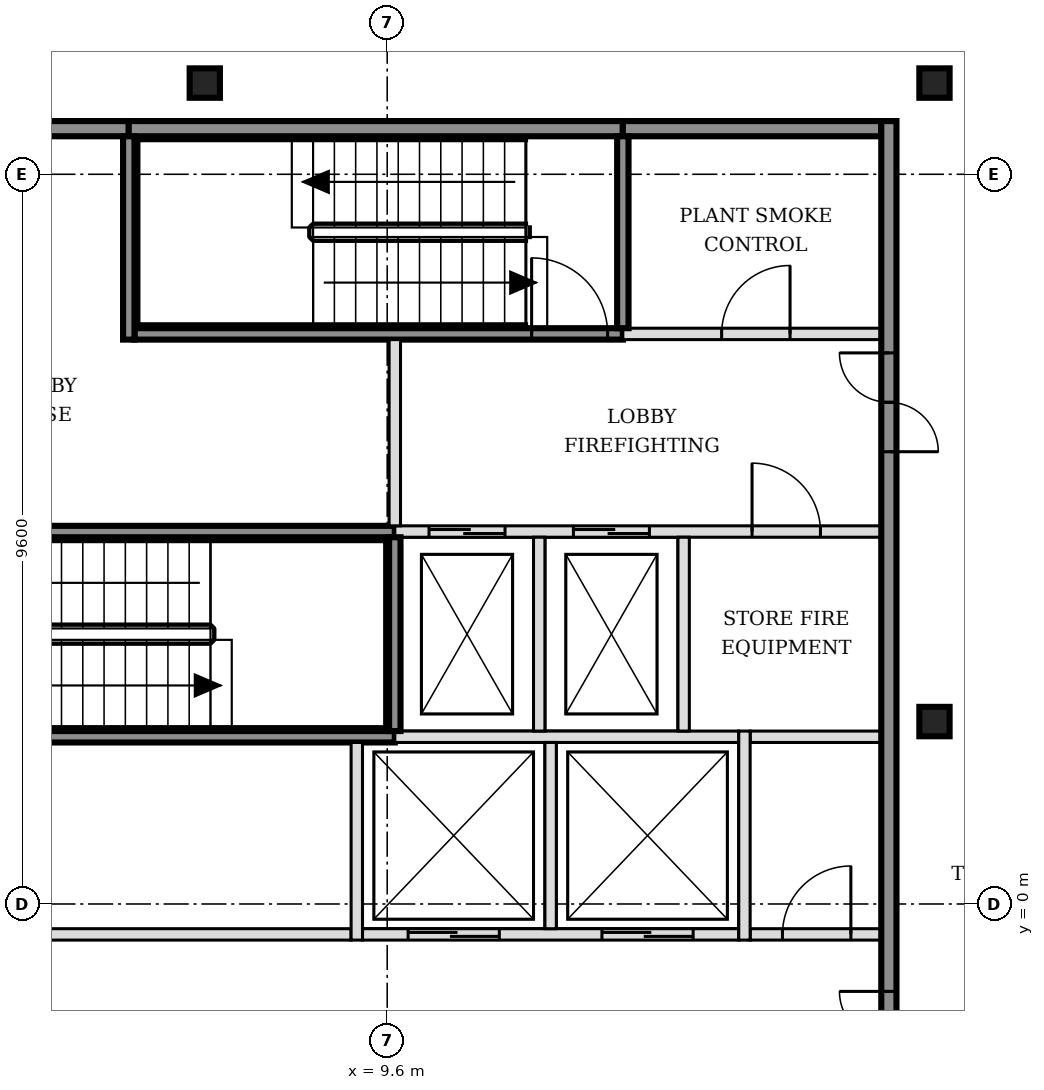
"""IFC4 building model, lengths in metres.
Left out: names, types, materials, properties, quantities, classifications, styles, units other than length and angle.
Written with IfcOpenShell. Run it as: python <this file> out.ifc"""

import sys

from ifc_helpers import new_model, si_unit, direction, frame, frame_2d, origin, origin_2d, place, context, subcontext, project, spatial, rectangle, i_section, extrude, element, fill, save


model = new_model("IFC4")
c1 = context("Model", 3, precision=1e-05, world=origin(), true_north=direction((0.0, 1.0)))
c2 = subcontext(c1, "Body", "Model", "MODEL_VIEW")
j1 = project(units=[si_unit("LENGTHUNIT", "METRE"), si_unit("PLANEANGLEUNIT", "RADIAN")], contexts=[c1])
p1 = place(None, origin())
s1 = spatial("IfcSite", under=j1, at=p1, CompositionType="ELEMENT")
p2 = place(p1, origin())
s2 = spatial("IfcBuilding", under=s1, at=p2, CompositionType="ELEMENT")
p3 = place(p2, frame((0.0, 0.0, 267.0)))
s3 = spatial("IfcBuildingStorey", under=s2, at=p3, CompositionType="ELEMENT", Elevation=267.0)
for number, where, z_axis, x_axis in (
    (1, (16.8, 2.4, -0.15), (0.0, 0.0, 1.0), (1.0, 0.0, 0.0)),
    (2, (7.2, 10.8, -0.15), (0.0, 0.0, 1.0), (1.0, 0.0, 0.0)),
    (3, (16.8, 10.8, -0.15), (0.0, 0.0, 1.0), (1.0, 0.0, 0.0)),
):
    element("IfcColumn", number, at=place(p3, frame(where, z_axis=z_axis, x_axis=x_axis)), inside=s3, PredefinedType="COLUMN", context=c2, shape_type="SweptSolid", body=[
        extrude(i_section(OverallWidth=0.398, OverallDepth=0.387, WebThickness=0.021, FlangeThickness=0.033, FilletRadius=0.015, at=origin_2d()), origin(), (0.0, 0.0, 1.0), 3.6),
    ])
p4 = place(p3, frame((-1.7, -0.4, 0.0), z_axis=(0.0, 0.0, 1.0), x_axis=(1.0, 0.0, 0.0)))
e4 = element("IfcWall", 4, at=p4, inside=s3, PredefinedType="PARTITIONING", context=c2, shape_type="SweptSolid", body=[
    extrude(rectangle(XDim=10.825, YDim=0.15, at=frame_2d((5.413, 0.0))), origin(), (0.0, 0.0, 1.0), 3.45),
])
p5 = place(p4, frame((4.95, 0.0, 0.0)))
e5 = element("IfcOpeningElement", 5, at=p5, cuts=e4, PredefinedType="OPENING", context=c2, shape_type="SweptSolid", body=[
    extrude(rectangle(XDim=0.9, YDim=2.1, at=frame_2d((0.45, 1.05))), frame((0.0, 0.085, 0.0), z_axis=(0.0, -1.0, 0.0), x_axis=(1.0, 0.0, 0.0)), (0.0, 0.0, 1.0), 0.17),
])
p6 = place(p3, frame((9.275, -0.4, 0.0), z_axis=(0.0, 0.0, 1.0), x_axis=(1.0, 0.0, 0.0)))
e6 = element("IfcWall", 6, at=p6, inside=s3, PredefinedType="SOLIDWALL", context=c2, shape_type="SweptSolid", body=[
    extrude(rectangle(XDim=4.95, YDim=0.15, at=frame_2d((2.475, 0.0))), origin(), (0.0, 0.0, 1.0), 3.45),
])
p7 = place(p6, frame((0.6, 0.0, 0.0)))
e7 = element("IfcOpeningElement", 7, at=p7, cuts=e6, PredefinedType="OPENING", context=c2, shape_type="SweptSolid", body=[
    extrude(rectangle(XDim=1.2, YDim=2.1, at=frame_2d((0.6, 1.05))), frame((0.0, 0.085, 0.0), z_axis=(0.0, -1.0, 0.0), x_axis=(1.0, 0.0, 0.0)), (0.0, 0.0, 1.0), 0.17),
])
p8 = place(p6, frame((3.15, 0.0, 0.0)))
e8 = element("IfcOpeningElement", 8, at=p8, cuts=e6, PredefinedType="OPENING", context=c2, shape_type="SweptSolid", body=[
    extrude(rectangle(XDim=1.2, YDim=2.1, at=frame_2d((0.6, 1.05))), frame((0.0, 0.085, 0.0), z_axis=(0.0, -1.0, 0.0), x_axis=(1.0, 0.0, 0.0)), (0.0, 0.0, 1.0), 0.17),
])
p9 = place(p3, frame((14.375, -0.4, 0.0), z_axis=(0.0, 0.0, 1.0), x_axis=(1.0, 0.0, 0.0)))
e9 = element("IfcWall", 9, at=p9, inside=s3, PredefinedType="PARTITIONING", context=c2, shape_type="SweptSolid", body=[
    extrude(rectangle(XDim=1.725, YDim=0.15, at=frame_2d((0.863, 0.0))), origin(), (0.0, 0.0, 1.0), 3.45),
])
p10 = place(p9, frame((0.425, 0.0, 0.0)))
e10 = element("IfcOpeningElement", 10, at=p10, cuts=e9, PredefinedType="OPENING", context=c2, shape_type="SweptSolid", body=[
    extrude(rectangle(XDim=0.9, YDim=2.1, at=frame_2d((0.45, 1.05))), frame((0.0, 0.085, 0.0), z_axis=(0.0, -1.0, 0.0), x_axis=(1.0, 0.0, 0.0)), (0.0, 0.0, 1.0), 0.17),
])
p11 = place(p3, frame((3.2, 2.2, 0.0), z_axis=(0.0, 0.0, 1.0), x_axis=(1.0, 0.0, 0.0)))
e11 = element("IfcWall", 11, at=p11, inside=s3, PredefinedType="SOLIDWALL", context=c2, shape_type="SweptSolid", body=[
    extrude(rectangle(XDim=6.5, YDim=0.15, at=frame_2d((3.25, 0.0))), origin(), (0.0, 0.0, 1.0), 3.45),
])
p12 = place(p3, frame((9.7, 2.2, 0.0), z_axis=(0.0, 0.0, 1.0), x_axis=(1.0, 0.0, 0.0)))
e12 = element("IfcWall", 12, at=p12, inside=s3, PredefinedType="SOLIDWALL", context=c2, shape_type="SweptSolid", body=[
    extrude(rectangle(XDim=4.525, YDim=0.15, at=frame_2d((2.263, 0.0))), origin(), (0.0, 0.0, 1.0), 3.45),
])
p13 = place(p3, frame((14.375, 2.2, 0.0), z_axis=(0.0, 0.0, 1.0), x_axis=(1.0, 0.0, 0.0)))
e13 = element("IfcWall", 13, at=p13, inside=s3, PredefinedType="PARTITIONING", context=c2, shape_type="SweptSolid", body=[
    extrude(rectangle(XDim=1.725, YDim=0.15, at=frame_2d((0.863, 0.0))), origin(), (0.0, 0.0, 1.0), 3.45),
])
p14 = place(p3, frame((3.2, 4.9, 0.0), z_axis=(0.0, 0.0, 1.0), x_axis=(1.0, 0.0, 0.0)))
e14 = element("IfcWall", 14, at=p14, inside=s3, PredefinedType="SOLIDWALL", context=c2, shape_type="SweptSolid", body=[
    extrude(rectangle(XDim=6.5, YDim=0.15, at=frame_2d((3.25, 0.0))), origin(), (0.0, 0.0, 1.0), 3.45),
])
p15 = place(p14, frame((0.175, 0.0, 0.0)))
e15 = element("IfcOpeningElement", 15, at=p15, cuts=e14, PredefinedType="OPENING", context=c2, shape_type="SweptSolid", body=[
    extrude(rectangle(XDim=1.0, YDim=2.1, at=frame_2d((0.5, 1.05))), frame((0.0, 0.085, 0.0), z_axis=(0.0, -1.0, 0.0), x_axis=(1.0, 0.0, 0.0)), (0.0, 0.0, 1.0), 0.17),
])
p16 = place(p3, frame((9.7, 4.9, 0.0), z_axis=(0.0, 0.0, 1.0), x_axis=(1.0, 0.0, 0.0)))
e16 = element("IfcWall", 16, at=p16, inside=s3, PredefinedType="SOLIDWALL", context=c2, shape_type="SweptSolid", body=[
    extrude(rectangle(XDim=6.4, YDim=0.15, at=frame_2d((3.2, 0.0))), origin(), (0.0, 0.0, 1.0), 3.45),
])
p17 = place(p16, frame((0.45, 0.0, 0.0)))
e17 = element("IfcOpeningElement", 17, at=p17, cuts=e16, PredefinedType="OPENING", context=c2, shape_type="SweptSolid", body=[
    extrude(rectangle(XDim=1.0, YDim=2.1, at=frame_2d((0.5, 1.05))), frame((0.0, 0.085, 0.0), z_axis=(0.0, -1.0, 0.0), x_axis=(1.0, 0.0, 0.0)), (0.0, 0.0, 1.0), 0.17),
])
p18 = place(p16, frame((2.35, 0.0, 0.0)))
e18 = element("IfcOpeningElement", 18, at=p18, cuts=e16, PredefinedType="OPENING", context=c2, shape_type="SweptSolid", body=[
    extrude(rectangle(XDim=1.0, YDim=2.1, at=frame_2d((0.5, 1.05))), frame((0.0, 0.085, 0.0), z_axis=(0.0, -1.0, 0.0), x_axis=(1.0, 0.0, 0.0)), (0.0, 0.0, 1.0), 0.17),
])
p19 = place(p16, frame((4.7, 0.0, 0.0)))
e19 = element("IfcOpeningElement", 19, at=p19, cuts=e16, PredefinedType="OPENING", context=c2, shape_type="SweptSolid", body=[
    extrude(rectangle(XDim=0.9, YDim=2.1, at=frame_2d((0.45, 1.05))), frame((0.0, 0.085, 0.0), z_axis=(0.0, -1.0, 0.0), x_axis=(1.0, 0.0, 0.0)), (0.0, 0.0, 1.0), 0.17),
])
p20 = place(p3, frame((6.275, 7.5, 0.0), z_axis=(0.0, 0.0, 1.0), x_axis=(1.0, 0.0, 0.0)))
e20 = element("IfcWall", 20, at=p20, inside=s3, PredefinedType="SOLIDWALL", context=c2, shape_type="SweptSolid", body=[
    extrude(rectangle(XDim=6.425, YDim=0.15, at=frame_2d((3.212, 0.0))), origin(), (0.0, 0.0, 1.0), 3.45),
])
p21 = place(p20, frame((5.225, 0.0, 0.0)))
e21 = element("IfcOpeningElement", 21, at=p21, cuts=e20, PredefinedType="OPENING", context=c2, shape_type="SweptSolid", body=[
    extrude(rectangle(XDim=1.0, YDim=2.1, at=frame_2d((0.5, 1.05))), frame((0.0, 0.085, 0.0), z_axis=(0.0, -1.0, 0.0), x_axis=(1.0, 0.0, 0.0)), (0.0, 0.0, 1.0), 0.17),
])
p22 = place(p3, frame((12.7, 7.5, 0.0), z_axis=(0.0, 0.0, 1.0), x_axis=(1.0, 0.0, 0.0)))
e22 = element("IfcWall", 22, at=p22, inside=s3, PredefinedType="SOLIDWALL", context=c2, shape_type="SweptSolid", body=[
    extrude(rectangle(XDim=3.4, YDim=0.15, at=frame_2d((1.7, 0.0))), origin(), (0.0, 0.0, 1.0), 3.45),
])
p23 = place(p22, frame((1.3, 0.0, 0.0)))
e23 = element("IfcOpeningElement", 23, at=p23, cuts=e22, PredefinedType="OPENING", context=c2, shape_type="SweptSolid", body=[
    extrude(rectangle(XDim=0.9, YDim=2.1, at=frame_2d((0.45, 1.05))), frame((0.0, 0.085, 0.0), z_axis=(0.0, -1.0, 0.0), x_axis=(1.0, 0.0, 0.0)), (0.0, 0.0, 1.0), 0.17),
])
p24 = place(p3, frame((-1.7, 10.2, 0.0), z_axis=(0.0, 0.0, 1.0), x_axis=(1.0, 0.0, 0.0)))
e24 = element("IfcWall", 24, at=p24, inside=s3, PredefinedType="SOLIDWALL", context=c2, shape_type="SweptSolid", body=[
    extrude(rectangle(XDim=7.9, YDim=0.2, at=frame_2d((3.95, 0.0))), origin(), (0.0, 0.0, 1.0), 3.45),
])
p25 = place(p3, frame((6.2, 10.2, 0.0), z_axis=(0.0, 0.0, 1.0), x_axis=(1.0, 0.0, 0.0)))
e25 = element("IfcWall", 25, at=p25, inside=s3, PredefinedType="SOLIDWALL", context=c2, shape_type="SweptSolid", body=[
    extrude(rectangle(XDim=6.5, YDim=0.2, at=frame_2d((3.25, 0.0))), origin(), (0.0, 0.0, 1.0), 3.45),
])
p26 = place(p3, frame((12.7, 10.2, 0.0), z_axis=(0.0, 0.0, 1.0), x_axis=(1.0, 0.0, 0.0)))
e26 = element("IfcWall", 26, at=p26, inside=s3, PredefinedType="SOLIDWALL", context=c2, shape_type="SweptSolid", body=[
    extrude(rectangle(XDim=3.4, YDim=0.2, at=frame_2d((1.7, 0.0))), origin(), (0.0, 0.0, 1.0), 3.45),
])
p27 = place(p3, frame((6.2, 7.425, 0.0), z_axis=(0.0, 0.0, 1.0), x_axis=(0.0, 1.0, 0.0)))
e27 = element("IfcWall", 27, at=p27, inside=s3, PredefinedType="SOLIDWALL", context=c2, shape_type="SweptSolid", body=[
    extrude(rectangle(XDim=2.675, YDim=0.15, at=frame_2d((1.337, 0.0))), origin(), (0.0, 0.0, 1.0), 3.45),
])
p28 = place(p3, frame((9.2, -0.475, 0.0), z_axis=(0.0, 0.0, 1.0), x_axis=(0.0, 1.0, 0.0)))
e28 = element("IfcWall", 28, at=p28, inside=s3, PredefinedType="SOLIDWALL", context=c2, shape_type="SweptSolid", body=[
    extrude(rectangle(XDim=2.6, YDim=0.15, at=frame_2d((1.3, 0.0))), origin(), (0.0, 0.0, 1.0), 3.45),
])
p29 = place(p3, frame((9.7, 2.275, 0.0), z_axis=(0.0, 0.0, 1.0), x_axis=(0.0, 1.0, 0.0)))
e29 = element("IfcWall", 29, at=p29, inside=s3, PredefinedType="SOLIDWALL", context=c2, shape_type="SweptSolid", body=[
    extrude(rectangle(XDim=2.55, YDim=0.15, at=frame_2d((1.275, 0.0))), origin(), (0.0, 0.0, 1.0), 3.45),
])
p30 = place(p3, frame((9.7, 4.975, 0.0), z_axis=(0.0, 0.0, 1.0), x_axis=(0.0, 1.0, 0.0)))
e30 = element("IfcWall", 30, at=p30, inside=s3, PredefinedType="SOLIDWALL", context=c2, shape_type="SweptSolid", body=[
    extrude(rectangle(XDim=2.45, YDim=0.15, at=frame_2d((1.225, 0.0))), origin(), (0.0, 0.0, 1.0), 3.45),
])
p31 = place(p3, frame((11.6, 2.275, 0.0), z_axis=(0.0, 0.0, 1.0), x_axis=(0.0, 1.0, 0.0)))
e31 = element("IfcWall", 31, at=p31, inside=s3, PredefinedType="SOLIDWALL", context=c2, shape_type="SweptSolid", body=[
    extrude(rectangle(XDim=2.55, YDim=0.15, at=frame_2d((1.275, 0.0))), origin(), (0.0, 0.0, 1.0), 3.45),
])
p32 = place(p3, frame((11.75, -0.325, 0.0), z_axis=(0.0, 0.0, 1.0), x_axis=(0.0, 1.0, 0.0)))
e32 = element("IfcWall", 32, at=p32, inside=s3, PredefinedType="SOLIDWALL", context=c2, shape_type="SweptSolid", body=[
    extrude(rectangle(XDim=2.45, YDim=0.15, at=frame_2d((1.225, 0.0))), origin(), (0.0, 0.0, 1.0), 3.45),
])
p33 = place(p3, frame((12.7, 7.575, 0.0), z_axis=(0.0, 0.0, 1.0), x_axis=(0.0, 1.0, 0.0)))
e33 = element("IfcWall", 33, at=p33, inside=s3, PredefinedType="SOLIDWALL", context=c2, shape_type="SweptSolid", body=[
    extrude(rectangle(XDim=2.525, YDim=0.15, at=frame_2d((1.263, 0.0))), origin(), (0.0, 0.0, 1.0), 3.45),
])
p34 = place(p3, frame((13.5, 2.275, 0.0), z_axis=(0.0, 0.0, 1.0), x_axis=(0.0, 1.0, 0.0)))
e34 = element("IfcWall", 34, at=p34, inside=s3, PredefinedType="SOLIDWALL", context=c2, shape_type="SweptSolid", body=[
    extrude(rectangle(XDim=2.55, YDim=0.15, at=frame_2d((1.275, 0.0))), origin(), (0.0, 0.0, 1.0), 3.45),
])
p35 = place(p3, frame((14.3, -0.475, 0.0), z_axis=(0.0, 0.0, 1.0), x_axis=(0.0, 1.0, 0.0)))
e35 = element("IfcWall", 35, at=p35, inside=s3, PredefinedType="SOLIDWALL", context=c2, shape_type="SweptSolid", body=[
    extrude(rectangle(XDim=2.75, YDim=0.15, at=frame_2d((1.375, 0.0))), origin(), (0.0, 0.0, 1.0), 3.45),
])
p36 = place(p3, frame((16.2, -5.5, 0.0), z_axis=(0.0, 0.0, 1.0), x_axis=(0.0, 1.0, 0.0)))
e36 = element("IfcWall", 36, at=p36, inside=s3, PredefinedType="SOLIDWALL", context=c2, shape_type="SweptSolid", body=[
    extrude(rectangle(XDim=15.8, YDim=0.2, at=frame_2d((7.9, 0.0))), origin(), (0.0, 0.0, 1.0), 3.45),
])
p37 = place(p36, frame((3.05, 0.0, 0.0)))
e37 = element("IfcOpeningElement", 37, at=p37, cuts=e36, PredefinedType="OPENING", context=c2, shape_type="SweptSolid", body=[
    extrude(rectangle(XDim=1.3, YDim=2.1, at=frame_2d((0.65, 1.05))), frame((0.0, 0.11, 0.0), z_axis=(0.0, -1.0, 0.0), x_axis=(1.0, 0.0, 0.0)), (0.0, 0.0, 1.0), 0.22),
])
p38 = place(p36, frame((11.45, 0.0, 0.0)))
e38 = element("IfcOpeningElement", 38, at=p38, cuts=e36, PredefinedType="OPENING", context=c2, shape_type="SweptSolid", body=[
    extrude(rectangle(XDim=1.3, YDim=2.1, at=frame_2d((0.65, 1.05))), frame((0.0, 0.11, 0.0), z_axis=(0.0, -1.0, 0.0), x_axis=(1.0, 0.0, 0.0)), (0.0, 0.0, 1.0), 0.22),
])
p39 = place(p3, frame((14.322, -16.672, 0.0), z_axis=(0.0, 0.0, 1.0), x_axis=(0.707106781187, 0.707106781187, 0.0)))
e39 = element("IfcWall", 39, at=p39, inside=s3, PredefinedType="PARTITIONING", context=c2, shape_type="SweptSolid", body=[
    extrude(rectangle(XDim=23.452, YDim=0.15, at=frame_2d((11.726, 0.0))), origin(), (0.0, 0.0, 1.0), 2.73),
])
p40 = place(p39, frame((19.357, 0.0, 0.0)))
e40 = element("IfcOpeningElement", 40, at=p40, cuts=e39, PredefinedType="OPENING", context=c2, shape_type="SweptSolid", body=[
    extrude(rectangle(XDim=1.8, YDim=2.1, at=frame_2d((0.9, 1.05))), frame((0.0, 0.085, 0.0), z_axis=(0.0, -1.0, 0.0), x_axis=(1.0, 0.0, 0.0)), (0.0, 0.0, 1.0), 0.17),
])
p41 = place(p39, frame((2.975, 0.0, 0.0)))
e41 = element("IfcOpeningElement", 41, at=p41, cuts=e39, PredefinedType="OPENING", context=c2, shape_type="SweptSolid", body=[
    extrude(rectangle(XDim=0.9, YDim=2.1, at=frame_2d((0.45, 1.05))), frame((0.0, 0.085, 0.0), z_axis=(0.0, -1.0, 0.0), x_axis=(1.0, 0.0, 0.0)), (0.0, 0.0, 1.0), 0.17),
])
p42 = place(p39, frame((12.587, 0.0, 0.0)))
e42 = element("IfcOpeningElement", 42, at=p42, cuts=e39, PredefinedType="OPENING", context=c2, shape_type="SweptSolid", body=[
    extrude(rectangle(XDim=0.9, YDim=2.1, at=frame_2d((0.45, 1.05))), frame((0.0, 0.085, 0.0), z_axis=(0.0, -1.0, 0.0), x_axis=(1.0, 0.0, 0.0)), (0.0, 0.0, 1.0), 0.17),
])
p43 = place(p7, origin())
e43 = element("IfcDoor", 43, at=p43, inside=s3, OperationType="DOUBLE_DOOR_SLIDING", PredefinedType="DOOR", context=c2, shape_type="SweptSolid", body=[
    extrude(rectangle(XDim=1.2, YDim=2.1, at=frame_2d((0.6, 1.05))), frame((0.0, 0.025, 0.0), z_axis=(0.0, -1.0, 0.0), x_axis=(1.0, 0.0, 0.0)), (0.0, 0.0, 1.0), 0.05),
])
fill(e7, e43)
p44 = place(p8, origin())
e44 = element("IfcDoor", 44, at=p44, inside=s3, OperationType="DOUBLE_DOOR_SLIDING", PredefinedType="DOOR", context=c2, shape_type="SweptSolid", body=[
    extrude(rectangle(XDim=1.2, YDim=2.1, at=frame_2d((0.6, 1.05))), frame((0.0, 0.025, 0.0), z_axis=(0.0, -1.0, 0.0), x_axis=(1.0, 0.0, 0.0)), (0.0, 0.0, 1.0), 0.05),
])
fill(e8, e44)
p45 = place(p17, origin())
e45 = element("IfcDoor", 45, at=p45, inside=s3, OperationType="DOUBLE_DOOR_SLIDING", PredefinedType="DOOR", context=c2, shape_type="SweptSolid", body=[
    extrude(rectangle(XDim=1.0, YDim=2.1, at=frame_2d((0.5, 1.05))), frame((0.0, 0.025, 0.0), z_axis=(0.0, -1.0, 0.0), x_axis=(1.0, 0.0, 0.0)), (0.0, 0.0, 1.0), 0.05),
])
fill(e17, e45)
p46 = place(p18, origin())
e46 = element("IfcDoor", 46, at=p46, inside=s3, OperationType="DOUBLE_DOOR_SLIDING", PredefinedType="DOOR", context=c2, shape_type="SweptSolid", body=[
    extrude(rectangle(XDim=1.0, YDim=2.1, at=frame_2d((0.5, 1.05))), frame((0.0, 0.025, 0.0), z_axis=(0.0, -1.0, 0.0), x_axis=(1.0, 0.0, 0.0)), (0.0, 0.0, 1.0), 0.05),
])
fill(e18, e46)
p47 = place(p21, origin())
e47 = element("IfcDoor", 47, at=p47, inside=s3, OperationType="SINGLE_SWING_LEFT", PredefinedType="DOOR", context=c2, shape_type="SweptSolid", body=[
    extrude(rectangle(XDim=1.0, YDim=2.1, at=frame_2d((0.5, 1.05))), frame((0.0, 0.025, 0.0), z_axis=(0.0, -1.0, 0.0), x_axis=(1.0, 0.0, 0.0)), (0.0, 0.0, 1.0), 0.05),
])
fill(e21, e47)
p48 = place(p37, origin())
e48 = element("IfcDoor", 48, at=p48, inside=s3, OperationType="DOUBLE_DOOR_SINGLE_SWING", PredefinedType="DOOR", context=c2, shape_type="SweptSolid", body=[
    extrude(rectangle(XDim=1.3, YDim=2.1, at=frame_2d((0.65, 1.05))), frame((0.0, 0.025, 0.0), z_axis=(0.0, -1.0, 0.0), x_axis=(1.0, 0.0, 0.0)), (0.0, 0.0, 1.0), 0.05),
])
fill(e37, e48)
p49 = place(p38, origin())
e49 = element("IfcDoor", 49, at=p49, inside=s3, OperationType="DOUBLE_DOOR_SINGLE_SWING", PredefinedType="DOOR", context=c2, shape_type="SweptSolid", body=[
    extrude(rectangle(XDim=1.3, YDim=2.1, at=frame_2d((0.65, 1.05))), frame((0.0, 0.025, 0.0), z_axis=(0.0, -1.0, 0.0), x_axis=(1.0, 0.0, 0.0)), (0.0, 0.0, 1.0), 0.05),
])
fill(e38, e49)
p50 = place(p10, origin())
e50 = element("IfcDoor", 50, at=p50, inside=s3, OperationType="SINGLE_SWING_RIGHT", PredefinedType="DOOR", context=c2, shape_type="SweptSolid", body=[
    extrude(rectangle(XDim=0.9, YDim=2.1, at=frame_2d((0.45, 1.05))), frame((0.0, 0.025, 0.0), z_axis=(0.0, -1.0, 0.0), x_axis=(1.0, 0.0, 0.0)), (0.0, 0.0, 1.0), 0.05),
])
fill(e10, e50)
p51 = place(p19, origin())
e51 = element("IfcDoor", 51, at=p51, inside=s3, OperationType="SINGLE_SWING_LEFT", PredefinedType="DOOR", context=c2, shape_type="SweptSolid", body=[
    extrude(rectangle(XDim=0.9, YDim=2.1, at=frame_2d((0.45, 1.05))), frame((0.0, 0.025, 0.0), z_axis=(0.0, -1.0, 0.0), x_axis=(1.0, 0.0, 0.0)), (0.0, 0.0, 1.0), 0.05),
])
fill(e19, e51)
p52 = place(p23, origin())
e52 = element("IfcDoor", 52, at=p52, inside=s3, OperationType="SINGLE_SWING_RIGHT", PredefinedType="DOOR", context=c2, shape_type="SweptSolid", body=[
    extrude(rectangle(XDim=0.9, YDim=2.1, at=frame_2d((0.45, 1.05))), frame((0.0, 0.025, 0.0), z_axis=(0.0, -1.0, 0.0), x_axis=(1.0, 0.0, 0.0)), (0.0, 0.0, 1.0), 0.05),
])
fill(e23, e52)
save(model, sys.argv[1])
